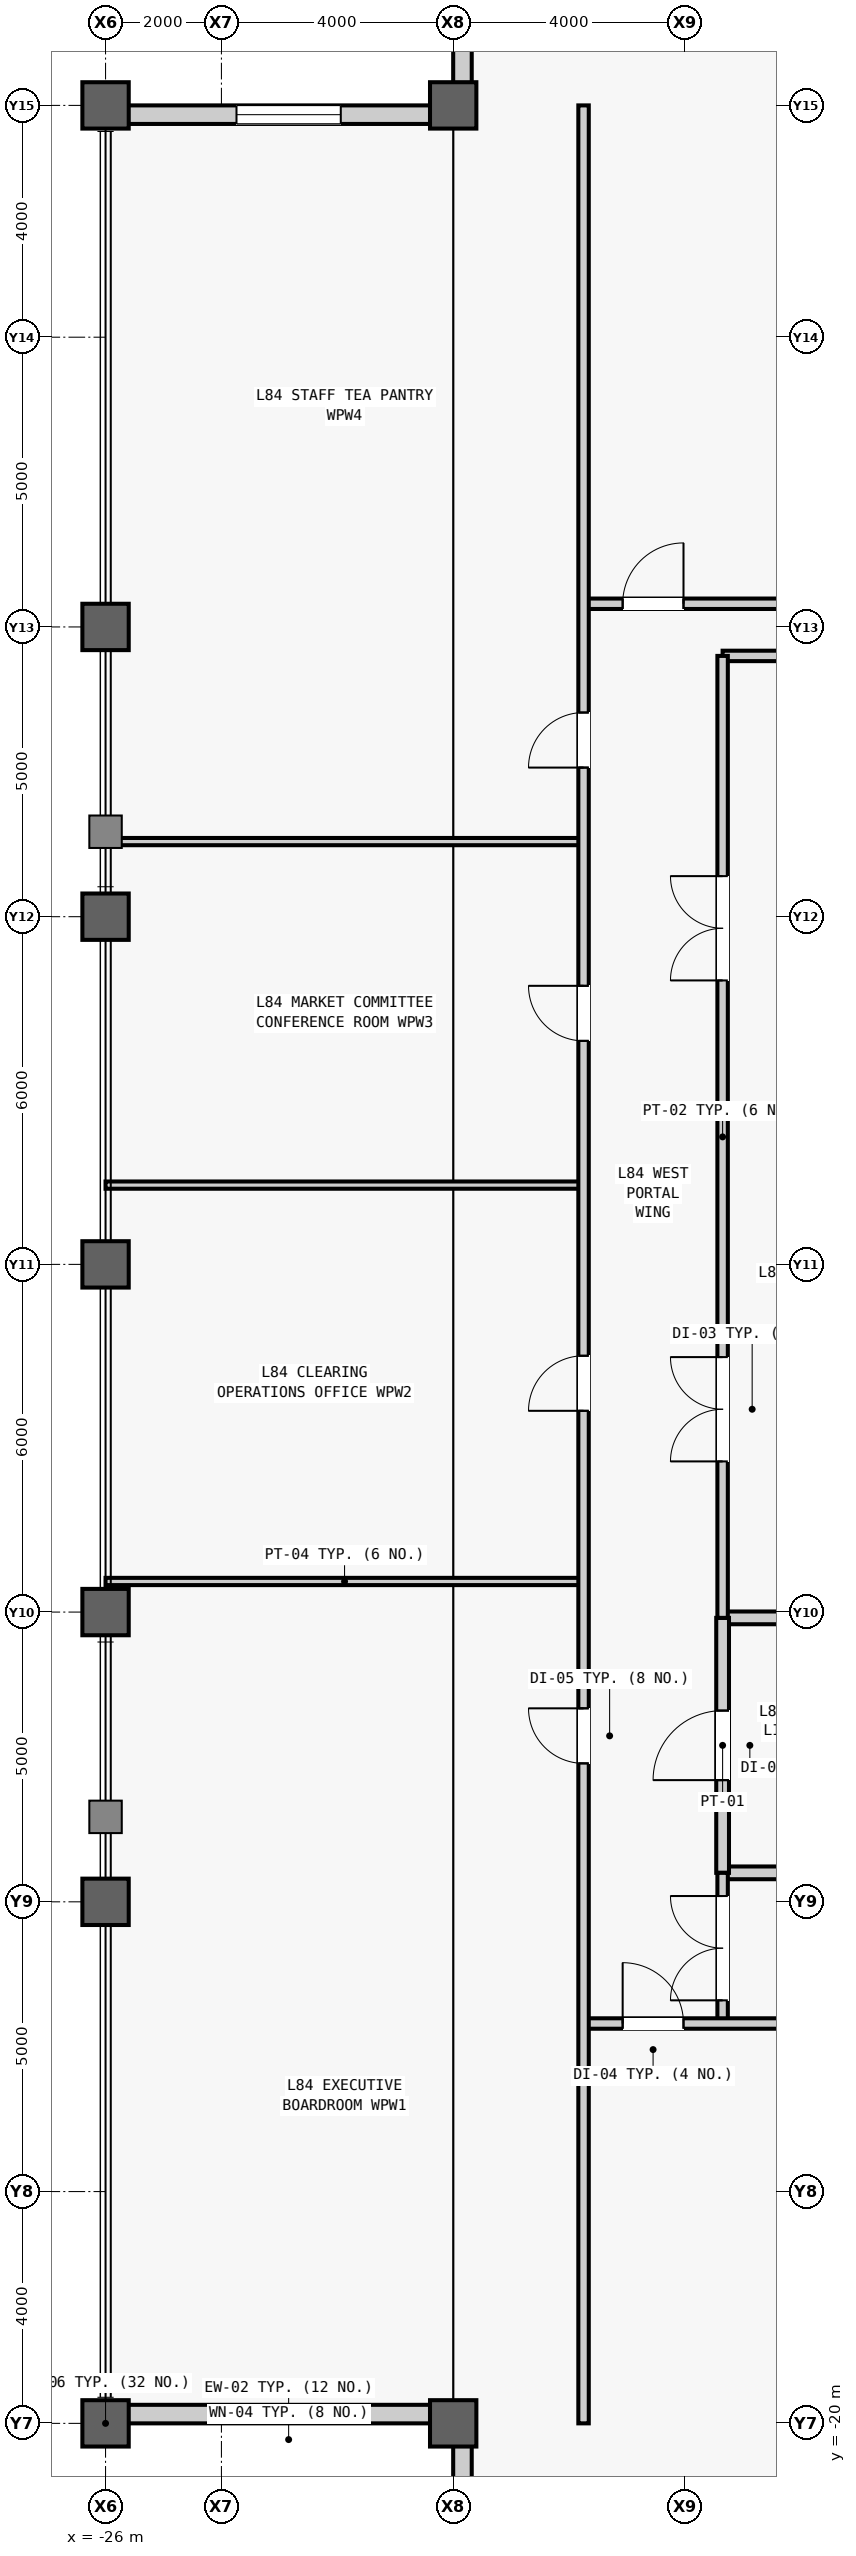
"""IFC4 building model, lengths in metres.
Left out: names, types, materials, properties, quantities, classifications, styles, units other than length and angle.
Written with IfcOpenShell. Run it as: python <this file> out.ifc"""

import sys

from ifc_helpers import new_model, si_unit, direction, frame, frame_2d, origin, origin_2d, place, context, subcontext, project, spatial, rectangle, hollow_rectangle, extrude, source, transform, mapped, element, fill, save


model = new_model("IFC4")
c1 = context("Model", 3, precision=1e-05, world=origin(), true_north=direction((0.0, 1.0)))
c2 = subcontext(c1, "Body", "Model", "MODEL_VIEW")
j1 = project(units=[si_unit("LENGTHUNIT", "METRE"), si_unit("PLANEANGLEUNIT", "RADIAN")], contexts=[c1])
p1 = place(None, origin())
s1 = spatial("IfcSite", under=j1, at=p1, CompositionType="ELEMENT")
p2 = place(p1, origin())
s2 = spatial("IfcBuilding", under=s1, at=p2, CompositionType="ELEMENT")
p3 = place(p2, frame((0.0, 0.0, 354.3)))
s3 = spatial("IfcBuildingStorey", under=s2, at=p3, CompositionType="ELEMENT", Elevation=354.3)
m1 = source(origin(), c2, "Body", "SweptSolid", [
    extrude(hollow_rectangle(XDim=0.8, YDim=0.8, WallThickness=0.045, at=origin_2d()), origin(), (0.0, 0.0, 1.0), 4.0),
])
for number, where, z_axis, x_axis in (
    (1, (-26.0, -20.0, 0.0), (0.0, 0.0, 1.0), (1.0, 0.0, 0.0)),
    (2, (-26.0, -11.0, 0.0), (0.0, 0.0, 1.0), (1.0, 0.0, 0.0)),
    (3, (-26.0, -6.0, 0.0), (0.0, 0.0, 1.0), (1.0, 0.0, 0.0)),
    (4, (-26.0, 0.0, 0.0), (0.0, 0.0, 1.0), (1.0, 0.0, 0.0)),
    (5, (-26.0, 6.0, 0.0), (0.0, 0.0, 1.0), (1.0, 0.0, 0.0)),
    (6, (-26.0, 11.0, 0.0), (0.0, 0.0, 1.0), (1.0, 0.0, 0.0)),
    (7, (-26.0, 20.0, 0.0), (0.0, 0.0, 1.0), (1.0, 0.0, 0.0)),
    (8, (-20.0, -20.0, 0.0), (0.0, 0.0, 1.0), (1.0, 0.0, 0.0)),
    (9, (-20.0, 20.0, 0.0), (0.0, 0.0, 1.0), (1.0, 0.0, 0.0)),
):
    element("IfcColumn", number, at=place(p3, frame(where, z_axis=z_axis, x_axis=x_axis)), inside=s3, PredefinedType="COLUMN", context=c2, shape_type="MappedRepresentation", body=[
        mapped(m1, transform((0.0, 0.0, 0.0), scale=1.0)),
    ])
m2 = source(origin(), c2, "Body", "SweptSolid", [
    extrude(rectangle(XDim=5.68, YDim=0.32, at=frame_2d((2.84, 0.0))), origin(), (0.0, 0.0, 1.0), 3.191),
])
p4 = place(p3, frame((-20.0, -19.84, 0.0), z_axis=(0.0, 0.0, 1.0), x_axis=(-1.0, 0.0, 0.0)))
e10 = element("IfcWall", 10, at=p4, inside=s3, PredefinedType="STANDARD", context=c2, shape_type="MappedRepresentation", body=[
    mapped(m2, transform((0.0, 0.0, 0.0), scale=1.0)),
])
m3 = source(origin(), c2, "Body", "SweptSolid", [
    extrude(rectangle(XDim=1.8, YDim=2.4, at=frame_2d((0.9, 1.2))), frame((0.0, 0.17, 0.0), z_axis=(0.0, -1.0, 0.0), x_axis=(1.0, 0.0, 0.0)), (0.0, 0.0, 1.0), 0.34),
])
p5 = place(p4, frame((1.94, 0.0, 0.5)))
e11 = element("IfcOpeningElement", 11, at=p5, cuts=e10, PredefinedType="OPENING", context=c2, shape_type="MappedRepresentation", body=[
    mapped(m3, transform((0.0, 0.0, 0.0), scale=1.0)),
])
p6 = place(p3, frame((-19.84, -25.68, 0.0), z_axis=(0.0, 0.0, 1.0), x_axis=(0.0, 1.0, 0.0)))
e12 = element("IfcWall", 12, at=p6, inside=s3, PredefinedType="STANDARD", context=c2, shape_type="MappedRepresentation", body=[
    mapped(m2, transform((0.0, 0.0, 0.0), scale=1.0)),
])
p7 = place(p6, frame((1.94, 0.0, 0.5)))
e13 = element("IfcOpeningElement", 13, at=p7, cuts=e12, PredefinedType="OPENING", context=c2, shape_type="MappedRepresentation", body=[
    mapped(m3, transform((0.0, 0.0, 0.0), scale=1.0)),
])
p8 = place(p3, frame((-19.84, 20.0, 0.0), z_axis=(0.0, 0.0, 1.0), x_axis=(0.0, 1.0, 0.0)))
e14 = element("IfcWall", 14, at=p8, inside=s3, PredefinedType="STANDARD", context=c2, shape_type="MappedRepresentation", body=[
    mapped(m2, transform((0.0, 0.0, 0.0), scale=1.0)),
])
p9 = place(p8, frame((1.94, 0.0, 0.5)))
e15 = element("IfcOpeningElement", 15, at=p9, cuts=e14, PredefinedType="OPENING", context=c2, shape_type="MappedRepresentation", body=[
    mapped(m3, transform((0.0, 0.0, 0.0), scale=1.0)),
])
p10 = place(p3, frame((-20.0, 19.84, 0.0), z_axis=(0.0, 0.0, 1.0), x_axis=(-1.0, 0.0, 0.0)))
e16 = element("IfcWall", 16, at=p10, inside=s3, PredefinedType="STANDARD", context=c2, shape_type="MappedRepresentation", body=[
    mapped(m2, transform((0.0, 0.0, 0.0), scale=1.0)),
])
p11 = place(p10, frame((1.94, 0.0, 0.5)))
e17 = element("IfcOpeningElement", 17, at=p11, cuts=e16, PredefinedType="OPENING", context=c2, shape_type="MappedRepresentation", body=[
    mapped(m3, transform((0.0, 0.0, 0.0), scale=1.0)),
])
m4 = source(origin(), c2, "Body", "SweptSolid", [
    extrude(rectangle(XDim=4.05, YDim=0.22, at=frame_2d((2.025, 0.0))), origin(), (0.0, 0.0, 1.0), 3.74),
])
p12 = place(p3, frame((-15.35, -10.5, 0.0), z_axis=(0.0, 0.0, 1.0), x_axis=(1.0, 0.0, 0.0)))
e18 = element("IfcWall", 18, at=p12, inside=s3, PredefinedType="PARTITIONING", context=c2, shape_type="MappedRepresentation", body=[
    mapped(m4, transform((0.0, 0.0, 0.0), scale=1.0)),
])
m5 = source(origin(), c2, "Body", "SweptSolid", [
    extrude(rectangle(XDim=4.05, YDim=0.22, at=frame_2d((2.025, 0.0))), origin(), (0.0, 0.0, 1.0), 3.124),
])
p13 = place(p3, frame((-15.35, -6.1, 0.0), z_axis=(0.0, 0.0, 1.0), x_axis=(1.0, 0.0, 0.0)))
e19 = element("IfcWall", 19, at=p13, inside=s3, PredefinedType="PARTITIONING", context=c2, shape_type="MappedRepresentation", body=[
    mapped(m5, transform((0.0, 0.0, 0.0), scale=1.0)),
])
m6 = source(origin(), c2, "Body", "SweptSolid", [
    extrude(rectangle(XDim=4.4, YDim=0.22, at=frame_2d((2.2, 0.0))), origin(), (0.0, 0.0, 1.0), 3.74),
])
p14 = place(p3, frame((-15.35, -10.5, 0.0), z_axis=(0.0, 0.0, 1.0), x_axis=(0.0, 1.0, 0.0)))
e20 = element("IfcWall", 20, at=p14, inside=s3, PredefinedType="PARTITIONING", context=c2, shape_type="MappedRepresentation", body=[
    mapped(m6, transform((0.0, 0.0, 0.0), scale=1.0)),
])
m7 = source(origin(), c2, "Body", "SweptSolid", [
    extrude(rectangle(XDim=1.2, YDim=2.2, at=frame_2d((0.6, 1.1))), frame((0.0, 0.12, 0.0), z_axis=(0.0, -1.0, 0.0), x_axis=(1.0, 0.0, 0.0)), (0.0, 0.0, 1.0), 0.24),
])
p15 = place(p14, frame((1.6, 0.0, 0.0)))
e21 = element("IfcOpeningElement", 21, at=p15, cuts=e20, PredefinedType="OPENING", context=c2, shape_type="MappedRepresentation", body=[
    mapped(m7, transform((0.0, 0.0, 0.0), scale=1.0)),
])
m8 = source(origin(), c2, "Body", "SweptSolid", [
    extrude(rectangle(XDim=4.05, YDim=0.18, at=frame_2d((2.025, 0.0))), origin(), (0.0, 0.0, 1.0), 3.74),
])
p16 = place(p3, frame((-15.35, 10.5, 0.0), z_axis=(0.0, 0.0, 1.0), x_axis=(1.0, 0.0, 0.0)))
e22 = element("IfcWall", 22, at=p16, inside=s3, PredefinedType="PARTITIONING", context=c2, shape_type="MappedRepresentation", body=[
    mapped(m8, transform((0.0, 0.0, 0.0), scale=1.0)),
])
m9 = source(origin(), c2, "Body", "SweptSolid", [
    extrude(rectangle(XDim=16.6, YDim=0.18, at=frame_2d((8.3, 0.0))), origin(), (0.0, 0.0, 1.0), 3.74),
])
p17 = place(p3, frame((-15.35, -6.1, 0.0), z_axis=(0.0, 0.0, 1.0), x_axis=(0.0, 1.0, 0.0)))
e23 = element("IfcWall", 23, at=p17, inside=s3, PredefinedType="PARTITIONING", context=c2, shape_type="MappedRepresentation", body=[
    mapped(m9, transform((0.0, 0.0, 0.0), scale=1.0)),
])
m10 = source(origin(), c2, "Body", "SweptSolid", [
    extrude(rectangle(XDim=1.8, YDim=2.25, at=frame_2d((0.9, 1.125))), frame((0.0, 0.1, 0.0), z_axis=(0.0, -1.0, 0.0), x_axis=(1.0, 0.0, 0.0)), (0.0, 0.0, 1.0), 0.2),
])
p18 = place(p17, frame((2.7, 0.0, 0.0)))
e24 = element("IfcOpeningElement", 24, at=p18, cuts=e23, PredefinedType="OPENING", context=c2, shape_type="MappedRepresentation", body=[
    mapped(m10, transform((0.0, 0.0, 0.0), scale=1.0)),
])
p19 = place(p17, frame((11.0, 0.0, 0.0)))
e25 = element("IfcOpeningElement", 25, at=p19, cuts=e23, PredefinedType="OPENING", context=c2, shape_type="MappedRepresentation", body=[
    mapped(m10, transform((0.0, 0.0, 0.0), scale=1.0)),
])
m11 = source(origin(), c2, "Body", "SweptSolid", [
    extrude(rectangle(XDim=2.6, YDim=0.18, at=frame_2d((1.3, 0.0))), origin(), (0.0, 0.0, 1.0), 3.74),
])
p20 = place(p3, frame((-15.35, -13.1, 0.0), z_axis=(0.0, 0.0, 1.0), x_axis=(0.0, 1.0, 0.0)))
e26 = element("IfcWall", 26, at=p20, inside=s3, PredefinedType="PARTITIONING", context=c2, shape_type="MappedRepresentation", body=[
    mapped(m11, transform((0.0, 0.0, 0.0), scale=1.0)),
])
p21 = place(p20, frame((0.4, 0.0, 0.0)))
e27 = element("IfcOpeningElement", 27, at=p21, cuts=e26, PredefinedType="OPENING", context=c2, shape_type="MappedRepresentation", body=[
    mapped(m10, transform((0.0, 0.0, 0.0), scale=1.0)),
])
m12 = source(origin(), c2, "Body", "SweptSolid", [
    extrude(rectangle(XDim=22.55, YDim=0.18, at=frame_2d((11.275, 0.0))), origin(), (0.0, 0.0, 1.0), 3.74),
])
p22 = place(p3, frame((-17.75, -13.1, 0.0), z_axis=(0.0, 0.0, 1.0), x_axis=(1.0, 0.0, 0.0)))
e28 = element("IfcWall", 28, at=p22, inside=s3, PredefinedType="PARTITIONING", context=c2, shape_type="MappedRepresentation", body=[
    mapped(m12, transform((0.0, 0.0, 0.0), scale=1.0)),
])
m13 = source(origin(), c2, "Body", "SweptSolid", [
    extrude(rectangle(XDim=1.05, YDim=2.2, at=frame_2d((0.525, 1.1))), frame((0.0, 0.1, 0.0), z_axis=(0.0, -1.0, 0.0), x_axis=(1.0, 0.0, 0.0)), (0.0, 0.0, 1.0), 0.2),
])
p23 = place(p22, frame((0.675, 0.0, 0.0)))
e29 = element("IfcOpeningElement", 29, at=p23, cuts=e28, PredefinedType="OPENING", context=c2, shape_type="MappedRepresentation", body=[
    mapped(m13, transform((0.0, 0.0, 0.0), scale=1.0)),
])
m14 = source(origin(), c2, "Body", "SweptSolid", [
    extrude(rectangle(XDim=12.7, YDim=0.18, at=frame_2d((6.35, 0.0))), origin(), (0.0, 0.0, 1.0), 2.79),
])
p24 = place(p3, frame((-17.75, 11.4, 0.0), z_axis=(0.0, 0.0, 1.0), x_axis=(1.0, 0.0, 0.0)))
e30 = element("IfcWall", 30, at=p24, inside=s3, PredefinedType="PARTITIONING", context=c2, shape_type="MappedRepresentation", body=[
    mapped(m14, transform((0.0, 0.0, 0.0), scale=1.0)),
])
p25 = place(p24, frame((0.675, 0.0, 0.0)))
e31 = element("IfcOpeningElement", 31, at=p25, cuts=e30, PredefinedType="OPENING", context=c2, shape_type="MappedRepresentation", body=[
    mapped(m13, transform((0.0, 0.0, 0.0), scale=1.0)),
])
m15 = source(origin(), c2, "Body", "SweptSolid", [
    extrude(rectangle(XDim=8.25, YDim=0.125, at=frame_2d((4.125, 0.0))), origin(), (0.0, 0.0, 1.0), 3.74),
])
for number, where, z_axis, x_axis in (
    (32, (-26.0, -5.472, 0.0), (0.0, 0.0, 1.0), (1.0, 0.0, 0.0)),
    (33, (-26.0, 1.368, 0.0), (0.0, 0.0, 1.0), (1.0, 0.0, 0.0)),
    (34, (-26.0, 7.296, 0.0), (0.0, 0.0, 1.0), (1.0, 0.0, 0.0)),
):
    element("IfcWall", number, at=place(p3, frame(where, z_axis=z_axis, x_axis=x_axis)), inside=s3, PredefinedType="PARTITIONING", context=c2, shape_type="MappedRepresentation", body=[
        mapped(m15, transform((0.0, 0.0, 0.0), scale=1.0)),
    ])
m16 = source(origin(), c2, "Body", "SweptSolid", [
    extrude(rectangle(XDim=40.0, YDim=0.18, at=frame_2d((20.0, 0.0))), origin(), (0.0, 0.0, 1.0), 3.74),
])
p26 = place(p3, frame((-17.75, -20.0, 0.0), z_axis=(0.0, 0.0, 1.0), x_axis=(0.0, 1.0, 0.0)))
e35 = element("IfcWall", 35, at=p26, inside=s3, PredefinedType="PARTITIONING", context=c2, shape_type="MappedRepresentation", body=[
    mapped(m16, transform((0.0, 0.0, 0.0), scale=1.0)),
])
m17 = source(origin(), c2, "Body", "SweptSolid", [
    extrude(rectangle(XDim=0.95, YDim=2.15, at=frame_2d((0.475, 1.075))), frame((0.0, 0.1, 0.0), z_axis=(0.0, -1.0, 0.0), x_axis=(1.0, 0.0, 0.0)), (0.0, 0.0, 1.0), 0.2),
])
p27 = place(p26, frame((11.389, 0.0, 0.0)))
e36 = element("IfcOpeningElement", 36, at=p27, cuts=e35, PredefinedType="OPENING", context=c2, shape_type="MappedRepresentation", body=[
    mapped(m17, transform((0.0, 0.0, 0.0), scale=1.0)),
])
p28 = place(p26, frame((17.473, 0.0, 0.0)))
e37 = element("IfcOpeningElement", 37, at=p28, cuts=e35, PredefinedType="OPENING", context=c2, shape_type="MappedRepresentation", body=[
    mapped(m17, transform((0.0, 0.0, 0.0), scale=1.0)),
])
p29 = place(p26, frame((23.857, 0.0, 0.0)))
e38 = element("IfcOpeningElement", 38, at=p29, cuts=e35, PredefinedType="OPENING", context=c2, shape_type="MappedRepresentation", body=[
    mapped(m17, transform((0.0, 0.0, 0.0), scale=1.0)),
])
p30 = place(p26, frame((28.573, 0.0, 0.0)))
e39 = element("IfcOpeningElement", 39, at=p30, cuts=e35, PredefinedType="OPENING", context=c2, shape_type="MappedRepresentation", body=[
    mapped(m17, transform((0.0, 0.0, 0.0), scale=1.0)),
])
m18 = source(origin(), c2, "Body", "SweptSolid", [
    extrude(rectangle(XDim=1.8, YDim=2.4, at=frame_2d((0.9, 1.2))), frame((0.0, 0.03, 0.0), z_axis=(0.0, -1.0, 0.0), x_axis=(1.0, 0.0, 0.0)), (0.0, 0.0, 1.0), 0.06),
])
p31 = place(p5, origin())
e40 = element("IfcWindow", 40, at=p31, inside=s3, PartitioningType="SINGLE_PANEL", PredefinedType="WINDOW", context=c2, shape_type="MappedRepresentation", body=[
    mapped(m18, transform((0.0, 0.0, 0.0), scale=1.0)),
])
fill(e11, e40)
p32 = place(p11, origin())
e41 = element("IfcWindow", 41, at=p32, inside=s3, PartitioningType="SINGLE_PANEL", PredefinedType="WINDOW", context=c2, shape_type="MappedRepresentation", body=[
    mapped(m18, transform((0.0, 0.0, 0.0), scale=1.0)),
])
fill(e17, e41)
m19 = source(origin(), c2, "Body", "SweptSolid", [
    extrude(rectangle(XDim=1.2, YDim=2.2, at=frame_2d((0.6, 1.1))), frame((0.0, 0.025, 0.0), z_axis=(0.0, -1.0, 0.0), x_axis=(1.0, 0.0, 0.0)), (0.0, 0.0, 1.0), 0.05),
])
p33 = place(p15, origin())
e42 = element("IfcDoor", 42, at=p33, inside=s3, OperationType="SINGLE_SWING_LEFT", PredefinedType="DOOR", context=c2, shape_type="MappedRepresentation", body=[
    mapped(m19, transform((0.0, 0.0, 0.0), scale=1.0)),
])
fill(e21, e42)
m20 = source(origin(), c2, "Body", "SweptSolid", [
    extrude(rectangle(XDim=1.8, YDim=2.25, at=frame_2d((0.9, 1.125))), frame((0.0, 0.025, 0.0), z_axis=(0.0, -1.0, 0.0), x_axis=(1.0, 0.0, 0.0)), (0.0, 0.0, 1.0), 0.05),
])
p34 = place(p18, origin())
e43 = element("IfcDoor", 43, at=p34, inside=s3, OperationType="SINGLE_SWING_LEFT", PredefinedType="DOOR", context=c2, shape_type="MappedRepresentation", body=[
    mapped(m20, transform((0.0, 0.0, 0.0), scale=1.0)),
])
fill(e24, e43)
p35 = place(p19, origin())
e44 = element("IfcDoor", 44, at=p35, inside=s3, OperationType="SINGLE_SWING_RIGHT", PredefinedType="DOOR", context=c2, shape_type="MappedRepresentation", body=[
    mapped(m20, transform((0.0, 0.0, 0.0), scale=1.0)),
])
fill(e25, e44)
p36 = place(p21, origin())
e45 = element("IfcDoor", 45, at=p36, inside=s3, OperationType="DOUBLE_DOOR_SINGLE_SWING", PredefinedType="DOOR", context=c2, shape_type="MappedRepresentation", body=[
    mapped(m20, transform((0.0, 0.0, 0.0), scale=1.0)),
])
fill(e27, e45)
m21 = source(origin(), c2, "Body", "SweptSolid", [
    extrude(rectangle(XDim=1.05, YDim=2.2, at=frame_2d((0.525, 1.1))), frame((0.0, 0.025, 0.0), z_axis=(0.0, -1.0, 0.0), x_axis=(1.0, 0.0, 0.0)), (0.0, 0.0, 1.0), 0.05),
])
p37 = place(p23, origin())
e46 = element("IfcDoor", 46, at=p37, inside=s3, OperationType="SINGLE_SWING_LEFT", PredefinedType="DOOR", context=c2, shape_type="MappedRepresentation", body=[
    mapped(m21, transform((0.0, 0.0, 0.0), scale=1.0)),
])
fill(e29, e46)
p38 = place(p25, origin())
e47 = element("IfcDoor", 47, at=p38, inside=s3, OperationType="SINGLE_SWING_RIGHT", PredefinedType="DOOR", context=c2, shape_type="MappedRepresentation", body=[
    mapped(m21, transform((0.0, 0.0, 0.0), scale=1.0)),
])
fill(e31, e47)
m22 = source(origin(), c2, "Body", "SweptSolid", [
    extrude(rectangle(XDim=0.95, YDim=2.15, at=frame_2d((0.475, 1.075))), frame((0.0, 0.025, 0.0), z_axis=(0.0, -1.0, 0.0), x_axis=(1.0, 0.0, 0.0)), (0.0, 0.0, 1.0), 0.05),
])
p39 = place(p27, origin())
e48 = element("IfcDoor", 48, at=p39, inside=s3, OperationType="SINGLE_SWING_RIGHT", PredefinedType="DOOR", context=c2, shape_type="MappedRepresentation", body=[
    mapped(m22, transform((0.0, 0.0, 0.0), scale=1.0)),
])
fill(e36, e48)
p40 = place(p28, origin())
e49 = element("IfcDoor", 49, at=p40, inside=s3, OperationType="SINGLE_SWING_LEFT", PredefinedType="DOOR", context=c2, shape_type="MappedRepresentation", body=[
    mapped(m22, transform((0.0, 0.0, 0.0), scale=1.0)),
])
fill(e37, e49)
p41 = place(p29, origin())
e50 = element("IfcDoor", 50, at=p41, inside=s3, OperationType="SINGLE_SWING_RIGHT", PredefinedType="DOOR", context=c2, shape_type="MappedRepresentation", body=[
    mapped(m22, transform((0.0, 0.0, 0.0), scale=1.0)),
])
fill(e38, e50)
p42 = place(p30, origin())
e51 = element("IfcDoor", 51, at=p42, inside=s3, OperationType="SINGLE_SWING_LEFT", PredefinedType="DOOR", context=c2, shape_type="MappedRepresentation", body=[
    mapped(m22, transform((0.0, 0.0, 0.0), scale=1.0)),
])
fill(e39, e51)
save(model, sys.argv[1])
